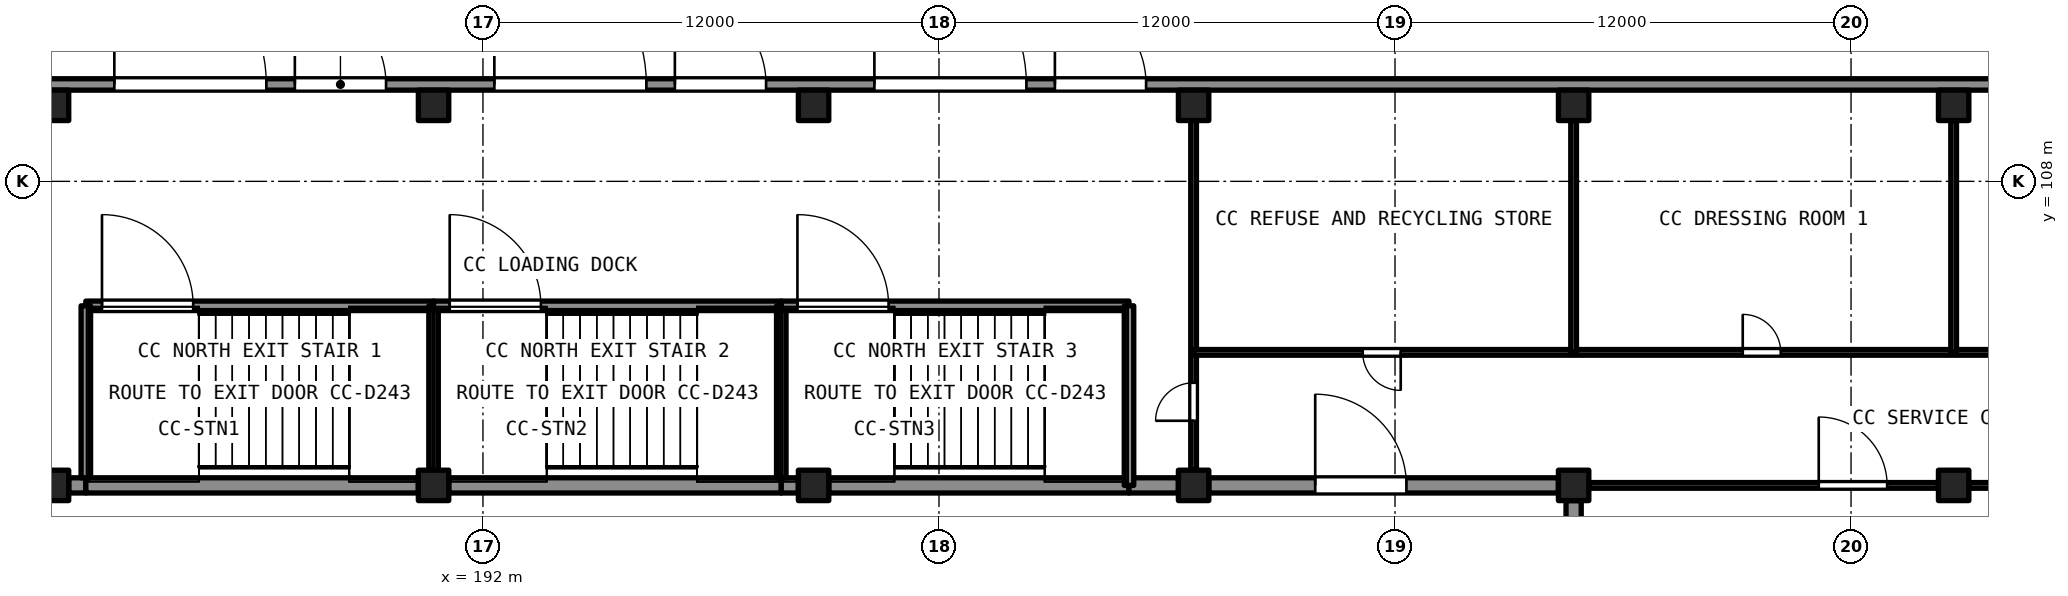
"""IFC4 building model, lengths in metres.
Left out: names, types, materials, properties, quantities, classifications, styles, units other than length and angle.
Written with IfcOpenShell. Run it as: python <this file> out.ifc"""

import sys

from ifc_helpers import new_model, si_unit, direction, frame, frame_2d, origin, origin_2d, place, context, subcontext, project, spatial, rectangle, extrude, element, fill, save


model = new_model("IFC4")
c1 = context("Model", 3, precision=1e-05, world=origin(), true_north=direction((0.0, 1.0)))
c2 = subcontext(c1, "Body", "Model", "MODEL_VIEW")
j1 = project(units=[si_unit("LENGTHUNIT", "METRE"), si_unit("PLANEANGLEUNIT", "RADIAN")], contexts=[c1])
p1 = place(None, origin())
s1 = spatial("IfcSite", under=j1, at=p1, CompositionType="ELEMENT")
p2 = place(p1, origin())
s2 = spatial("IfcBuilding", under=s1, at=p2, CompositionType="ELEMENT")
p3 = place(p2, origin())
s3 = spatial("IfcBuildingStorey", under=s2, at=p3, CompositionType="ELEMENT", Elevation=0.0)
for number, where, z_axis, x_axis in (
    (1, (180.7, 100.0, -1.2), (0.0, 0.0, 1.0), (1.0, 0.0, 0.0)),
    (2, (180.7, 110.0, -1.2), (0.0, 0.0, 1.0), (1.0, 0.0, 0.0)),
    (3, (190.7, 100.0, -1.2), (0.0, 0.0, 1.0), (1.0, 0.0, 0.0)),
    (4, (190.7, 110.0, -1.2), (0.0, 0.0, 1.0), (1.0, 0.0, 0.0)),
    (5, (200.7, 100.0, -1.2), (0.0, 0.0, 1.0), (1.0, 0.0, 0.0)),
    (6, (200.7, 110.0, -1.2), (0.0, 0.0, 1.0), (1.0, 0.0, 0.0)),
    (7, (210.7, 100.0, -1.2), (0.0, 0.0, 1.0), (1.0, 0.0, 0.0)),
    (8, (210.7, 110.0, -1.2), (0.0, 0.0, 1.0), (1.0, 0.0, 0.0)),
    (9, (220.7, 100.0, -1.2), (0.0, 0.0, 1.0), (1.0, 0.0, 0.0)),
    (10, (220.7, 110.0, -1.2), (0.0, 0.0, 1.0), (1.0, 0.0, 0.0)),
):
    element("IfcColumn", number, at=place(p3, frame(where, z_axis=z_axis, x_axis=x_axis)), inside=s3, PredefinedType="COLUMN", context=c2, shape_type="SweptSolid", body=[
        extrude(rectangle(XDim=0.8, YDim=0.8, at=origin_2d()), origin(), (0.0, 0.0, 1.0), 10.2),
    ])
p4 = place(p3, frame((230.7, 100.0, -1.2), z_axis=(0.0, 0.0, 1.0), x_axis=(1.0, 0.0, 0.0)))
e11 = element("IfcColumn", 11, at=p4, inside=s3, PredefinedType="COLUMN", context=c2, shape_type="SweptSolid", body=[
    extrude(rectangle(XDim=0.8, YDim=0.8, at=origin_2d()), origin(), (0.0, 0.0, 1.0), 9.745),
])
p5 = place(p3, frame((230.7, 110.0, -1.2), z_axis=(0.0, 0.0, 1.0), x_axis=(1.0, 0.0, 0.0)))
e12 = element("IfcColumn", 12, at=p5, inside=s3, PredefinedType="COLUMN", context=c2, shape_type="SweptSolid", body=[
    extrude(rectangle(XDim=0.8, YDim=0.8, at=origin_2d()), origin(), (0.0, 0.0, 1.0), 10.2),
])
p6 = place(p3, frame((181.1, 100.0, 0.0), z_axis=(0.0, 0.0, 1.0), x_axis=(1.0, 0.0, 0.0)))
e13 = element("IfcWall", 13, at=p6, inside=s3, PredefinedType="SHEAR", context=c2, shape_type="SweptSolid", body=[
    extrude(rectangle(XDim=0.45, YDim=0.4, at=frame_2d((0.225, 0.0))), origin(), (0.0, 0.0, 1.0), 9.0),
])
for number, where, z_axis, x_axis in (
    (14, (181.55, 100.0, 0.0), (0.0, 0.0, 1.0), (1.0, 0.0, 0.0)),
    (15, (191.1, 100.0, 0.0), (0.0, 0.0, 1.0), (1.0, 0.0, 0.0)),
):
    element("IfcWall", number, at=place(p3, frame(where, z_axis=z_axis, x_axis=x_axis)), inside=s3, PredefinedType="SHEAR", context=c2, shape_type="SweptSolid", body=[
        extrude(rectangle(XDim=8.75, YDim=0.4, at=frame_2d((4.375, 0.0))), origin(), (0.0, 0.0, 1.0), 9.0),
    ])
p7 = place(p3, frame((199.85, 100.0, 0.0), z_axis=(0.0, 0.0, 1.0), x_axis=(1.0, 0.0, 0.0)))
e16 = element("IfcWall", 16, at=p7, inside=s3, PredefinedType="SHEAR", context=c2, shape_type="SweptSolid", body=[
    extrude(rectangle(XDim=0.45, YDim=0.4, at=frame_2d((0.225, 0.0))), origin(), (0.0, 0.0, 1.0), 9.0),
])
p8 = place(p3, frame((201.1, 100.0, 0.0), z_axis=(0.0, 0.0, 1.0), x_axis=(1.0, 0.0, 0.0)))
e17 = element("IfcWall", 17, at=p8, inside=s3, PredefinedType="SHEAR", context=c2, shape_type="SweptSolid", body=[
    extrude(rectangle(XDim=7.9, YDim=0.4, at=frame_2d((3.95, 0.0))), origin(), (0.0, 0.0, 1.0), 9.0),
])
p9 = place(p3, frame((209.0, 100.0, 0.0), z_axis=(0.0, 0.0, 1.0), x_axis=(1.0, 0.0, 0.0)))
e18 = element("IfcWall", 18, at=p9, inside=s3, PredefinedType="SHEAR", context=c2, shape_type="SweptSolid", body=[
    extrude(rectangle(XDim=1.3, YDim=0.4, at=frame_2d((0.65, 0.0))), origin(), (0.0, 0.0, 1.0), 9.0),
])
p10 = place(p3, frame((211.1, 100.0, 0.0), z_axis=(0.0, 0.0, 1.0), x_axis=(1.0, 0.0, 0.0)))
e19 = element("IfcWall", 19, at=p10, inside=s3, PredefinedType="SHEAR", context=c2, shape_type="SweptSolid", body=[
    extrude(rectangle(XDim=9.2, YDim=0.4, at=frame_2d((4.6, 0.0))), origin(), (0.0, 0.0, 1.0), 9.0),
])
p11 = place(p10, frame((2.8, 0.0, 0.0)))
e20 = element("IfcOpeningElement", 20, at=p11, cuts=e19, PredefinedType="OPENING", context=c2, shape_type="SweptSolid", body=[
    extrude(rectangle(XDim=2.4, YDim=2.4, at=frame_2d((1.2, 1.2))), frame((0.0, 0.21, 0.0), z_axis=(0.0, -1.0, 0.0), x_axis=(1.0, 0.0, 0.0)), (0.0, 0.0, 1.0), 0.421),
])
p12 = place(p3, frame((220.7, 90.4, 0.0), z_axis=(0.0, 0.0, 1.0), x_axis=(0.0, 1.0, 0.0)))
e21 = element("IfcWall", 21, at=p12, inside=s3, PredefinedType="SHEAR", context=c2, shape_type="SweptSolid", body=[
    extrude(rectangle(XDim=9.2, YDim=0.4, at=frame_2d((4.6, 0.0))), origin(), (0.0, 0.0, 1.0), 9.0),
])
p13 = place(p3, frame((170.7, 110.55, 0.0), z_axis=(0.0, 0.0, 1.0), x_axis=(1.0, 0.0, 0.0)))
e22 = element("IfcWall", 22, at=p13, inside=s3, PredefinedType="SOLIDWALL", context=c2, shape_type="SweptSolid", body=[
    extrude(rectangle(XDim=80.55, YDim=0.3, at=frame_2d((40.275, 0.0))), origin(), (0.0, 0.0, 1.0), 8.59),
])
p14 = place(p13, frame((1.6, 0.0, 0.0)))
e23 = element("IfcOpeningElement", 23, at=p14, cuts=e22, PredefinedType="OPENING", context=c2, shape_type="SweptSolid", body=[
    extrude(rectangle(XDim=4.0, YDim=4.2, at=frame_2d((2.0, 2.1))), frame((0.0, 0.161, 0.0), z_axis=(0.0, -1.0, 0.0), x_axis=(1.0, 0.0, 0.0)), (0.0, 0.0, 1.0), 0.321),
])
p15 = place(p13, frame((11.6, 0.0, 0.0)))
e24 = element("IfcOpeningElement", 24, at=p15, cuts=e22, PredefinedType="OPENING", context=c2, shape_type="SweptSolid", body=[
    extrude(rectangle(XDim=4.0, YDim=4.2, at=frame_2d((2.0, 2.1))), frame((0.0, 0.161, 0.0), z_axis=(0.0, -1.0, 0.0), x_axis=(1.0, 0.0, 0.0)), (0.0, 0.0, 1.0), 0.321),
])
p16 = place(p13, frame((21.6, 0.0, 0.0)))
e25 = element("IfcOpeningElement", 25, at=p16, cuts=e22, PredefinedType="OPENING", context=c2, shape_type="SweptSolid", body=[
    extrude(rectangle(XDim=4.0, YDim=4.2, at=frame_2d((2.0, 2.1))), frame((0.0, 0.161, 0.0), z_axis=(0.0, -1.0, 0.0), x_axis=(1.0, 0.0, 0.0)), (0.0, 0.0, 1.0), 0.321),
])
p17 = place(p13, frame((31.6, 0.0, 0.0)))
e26 = element("IfcOpeningElement", 26, at=p17, cuts=e22, PredefinedType="OPENING", context=c2, shape_type="SweptSolid", body=[
    extrude(rectangle(XDim=4.0, YDim=4.2, at=frame_2d((2.0, 2.1))), frame((0.0, 0.161, 0.0), z_axis=(0.0, -1.0, 0.0), x_axis=(1.0, 0.0, 0.0)), (0.0, 0.0, 1.0), 0.321),
])
p18 = place(p13, frame((16.35, 0.0, 0.0)))
e27 = element("IfcOpeningElement", 27, at=p18, cuts=e22, PredefinedType="OPENING", context=c2, shape_type="SweptSolid", body=[
    extrude(rectangle(XDim=2.4, YDim=2.1, at=frame_2d((1.2, 1.05))), frame((0.0, 0.161, 0.0), z_axis=(0.0, -1.0, 0.0), x_axis=(1.0, 0.0, 0.0)), (0.0, 0.0, 1.0), 0.321),
])
p19 = place(p13, frame((26.35, 0.0, 0.0)))
e28 = element("IfcOpeningElement", 28, at=p19, cuts=e22, PredefinedType="OPENING", context=c2, shape_type="SweptSolid", body=[
    extrude(rectangle(XDim=2.4, YDim=2.1, at=frame_2d((1.2, 1.05))), frame((0.0, 0.161, 0.0), z_axis=(0.0, -1.0, 0.0), x_axis=(1.0, 0.0, 0.0)), (0.0, 0.0, 1.0), 0.321),
])
p20 = place(p13, frame((36.35, 0.0, 0.0)))
e29 = element("IfcOpeningElement", 29, at=p20, cuts=e22, PredefinedType="OPENING", context=c2, shape_type="SweptSolid", body=[
    extrude(rectangle(XDim=2.4, YDim=2.1, at=frame_2d((1.2, 1.05))), frame((0.0, 0.161, 0.0), z_axis=(0.0, -1.0, 0.0), x_axis=(1.0, 0.0, 0.0)), (0.0, 0.0, 1.0), 0.321),
])
p21 = place(p3, frame((221.1, 100.0, 0.0), z_axis=(0.0, 0.0, 1.0), x_axis=(1.0, 0.0, 0.0)))
e30 = element("IfcWall", 30, at=p21, inside=s3, PredefinedType="PARTITIONING", context=c2, shape_type="SweptSolid", body=[
    extrude(rectangle(XDim=9.2, YDim=0.15, at=frame_2d((4.6, 0.0))), origin(), (0.0, 0.0, 1.0), 8.54),
])
p22 = place(p21, frame((6.05, 0.0, 0.0)))
e31 = element("IfcOpeningElement", 31, at=p22, cuts=e30, PredefinedType="OPENING", context=c2, shape_type="SweptSolid", body=[
    extrude(rectangle(XDim=1.8, YDim=2.1, at=frame_2d((0.9, 1.05))), frame((0.0, 0.085, 0.0), z_axis=(0.0, -1.0, 0.0), x_axis=(1.0, 0.0, 0.0)), (0.0, 0.0, 1.0), 0.171),
])
p23 = place(p3, frame((231.1, 100.0, 0.0), z_axis=(0.0, 0.0, 1.0), x_axis=(1.0, 0.0, 0.0)))
e32 = element("IfcWall", 32, at=p23, inside=s3, PredefinedType="PARTITIONING", context=c2, shape_type="SweptSolid", body=[
    extrude(rectangle(XDim=7.3, YDim=0.15, at=frame_2d((3.65, 0.0))), origin(), (0.0, 0.0, 1.0), 8.54),
])
p24 = place(p3, frame((181.55, 104.725, 0.0), z_axis=(0.0, 0.0, 1.0), x_axis=(1.0, 0.0, 0.0)))
e33 = element("IfcWall", 33, at=p24, inside=s3, PredefinedType="SHEAR", context=c2, shape_type="SweptSolid", body=[
    extrude(rectangle(XDim=9.15, YDim=0.25, at=frame_2d((4.575, 0.0))), origin(), (0.0, 0.0, 1.0), 8.59),
])
p25 = place(p24, frame((0.425, 0.0, 0.0)))
e34 = element("IfcOpeningElement", 34, at=p25, cuts=e33, PredefinedType="OPENING", context=c2, shape_type="SweptSolid", body=[
    extrude(rectangle(XDim=2.4, YDim=2.1, at=frame_2d((1.2, 1.05))), frame((0.0, 0.135, 0.0), z_axis=(0.0, -1.0, 0.0), x_axis=(1.0, 0.0, 0.0)), (0.0, 0.0, 1.0), 0.271),
])
p26 = place(p3, frame((181.55, 100.2, 0.0), z_axis=(0.0, 0.0, 1.0), x_axis=(0.0, 1.0, 0.0)))
e35 = element("IfcWall", 35, at=p26, inside=s3, PredefinedType="SHEAR", context=c2, shape_type="SweptSolid", body=[
    extrude(rectangle(XDim=4.525, YDim=0.25, at=frame_2d((2.263, 0.0))), origin(), (0.0, 0.0, 1.0), 8.59),
])
p27 = place(p3, frame((190.7, 100.4, 0.0), z_axis=(0.0, 0.0, 1.0), x_axis=(0.0, 1.0, 0.0)))
e36 = element("IfcWall", 36, at=p27, inside=s3, PredefinedType="SHEAR", context=c2, shape_type="SweptSolid", body=[
    extrude(rectangle(XDim=4.325, YDim=0.25, at=frame_2d((2.163, 0.0))), origin(), (0.0, 0.0, 1.0), 8.59),
])
p28 = place(p3, frame((190.7, 104.725, 0.0), z_axis=(0.0, 0.0, 1.0), x_axis=(1.0, 0.0, 0.0)))
e37 = element("IfcWall", 37, at=p28, inside=s3, PredefinedType="SHEAR", context=c2, shape_type="SweptSolid", body=[
    extrude(rectangle(XDim=9.15, YDim=0.25, at=frame_2d((4.575, 0.0))), origin(), (0.0, 0.0, 1.0), 8.59),
])
p29 = place(p28, frame((0.425, 0.0, 0.0)))
e38 = element("IfcOpeningElement", 38, at=p29, cuts=e37, PredefinedType="OPENING", context=c2, shape_type="SweptSolid", body=[
    extrude(rectangle(XDim=2.4, YDim=2.1, at=frame_2d((1.2, 1.05))), frame((0.0, 0.135, 0.0), z_axis=(0.0, -1.0, 0.0), x_axis=(1.0, 0.0, 0.0)), (0.0, 0.0, 1.0), 0.271),
])
p30 = place(p3, frame((199.85, 100.2, 0.0), z_axis=(0.0, 0.0, 1.0), x_axis=(0.0, 1.0, 0.0)))
e39 = element("IfcWall", 39, at=p30, inside=s3, PredefinedType="SHEAR", context=c2, shape_type="SweptSolid", body=[
    extrude(rectangle(XDim=4.525, YDim=0.25, at=frame_2d((2.263, 0.0))), origin(), (0.0, 0.0, 1.0), 8.59),
])
p31 = place(p3, frame((199.85, 104.725, 0.0), z_axis=(0.0, 0.0, 1.0), x_axis=(1.0, 0.0, 0.0)))
e40 = element("IfcWall", 40, at=p31, inside=s3, PredefinedType="SHEAR", context=c2, shape_type="SweptSolid", body=[
    extrude(rectangle(XDim=9.15, YDim=0.25, at=frame_2d((4.575, 0.0))), origin(), (0.0, 0.0, 1.0), 8.59),
])
p32 = place(p31, frame((0.425, 0.0, 0.0)))
e41 = element("IfcOpeningElement", 41, at=p32, cuts=e40, PredefinedType="OPENING", context=c2, shape_type="SweptSolid", body=[
    extrude(rectangle(XDim=2.4, YDim=2.1, at=frame_2d((1.2, 1.05))), frame((0.0, 0.135, 0.0), z_axis=(0.0, -1.0, 0.0), x_axis=(1.0, 0.0, 0.0)), (0.0, 0.0, 1.0), 0.271),
])
p33 = place(p3, frame((209.0, 100.0, 0.0), z_axis=(0.0, 0.0, 1.0), x_axis=(0.0, 1.0, 0.0)))
e42 = element("IfcWall", 42, at=p33, inside=s3, PredefinedType="SHEAR", context=c2, shape_type="SweptSolid", body=[
    extrude(rectangle(XDim=4.725, YDim=0.25, at=frame_2d((2.363, 0.0))), origin(), (0.0, 0.0, 1.0), 8.59),
])
p34 = place(p3, frame((210.7, 109.6, 0.0), z_axis=(0.0, 0.0, 1.0), x_axis=(0.0, -1.0, 0.0)))
e43 = element("IfcWall", 43, at=p34, inside=s3, PredefinedType="PARTITIONING", context=c2, shape_type="SweptSolid", body=[
    extrude(rectangle(XDim=9.2, YDim=0.15, at=frame_2d((4.6, 0.0))), origin(), (0.0, 0.0, 1.0), 8.59),
])
p35 = place(p34, frame((6.9, 0.0, 0.0)))
e44 = element("IfcOpeningElement", 44, at=p35, cuts=e43, PredefinedType="OPENING", context=c2, shape_type="SweptSolid", body=[
    extrude(rectangle(XDim=1.0, YDim=2.1, at=frame_2d((0.5, 1.05))), frame((0.0, 0.085, 0.0), z_axis=(0.0, -1.0, 0.0), x_axis=(1.0, 0.0, 0.0)), (0.0, 0.0, 1.0), 0.171),
])
p36 = place(p3, frame((251.1, 103.5, 0.0), z_axis=(0.0, 0.0, 1.0), x_axis=(-1.0, 0.0, 0.0)))
e45 = element("IfcWall", 45, at=p36, inside=s3, PredefinedType="PARTITIONING", context=c2, shape_type="SweptSolid", body=[
    extrude(rectangle(XDim=40.4, YDim=0.15, at=frame_2d((20.2, 0.0))), origin(), (0.0, 0.0, 1.0), 8.59),
])
p37 = place(p36, frame((34.95, 0.0, 0.0)))
e46 = element("IfcOpeningElement", 46, at=p37, cuts=e45, PredefinedType="OPENING", context=c2, shape_type="SweptSolid", body=[
    extrude(rectangle(XDim=1.0, YDim=2.1, at=frame_2d((0.5, 1.05))), frame((0.0, 0.085, 0.0), z_axis=(0.0, -1.0, 0.0), x_axis=(1.0, 0.0, 0.0)), (0.0, 0.0, 1.0), 0.171),
])
p38 = place(p36, frame((24.95, 0.0, 0.0)))
e47 = element("IfcOpeningElement", 47, at=p38, cuts=e45, PredefinedType="OPENING", context=c2, shape_type="SweptSolid", body=[
    extrude(rectangle(XDim=1.0, YDim=2.1, at=frame_2d((0.5, 1.05))), frame((0.0, 0.085, 0.0), z_axis=(0.0, -1.0, 0.0), x_axis=(1.0, 0.0, 0.0)), (0.0, 0.0, 1.0), 0.171),
])
p39 = place(p36, frame((14.95, 0.0, 0.0)))
e48 = element("IfcOpeningElement", 48, at=p39, cuts=e45, PredefinedType="OPENING", context=c2, shape_type="SweptSolid", body=[
    extrude(rectangle(XDim=1.0, YDim=2.1, at=frame_2d((0.5, 1.05))), frame((0.0, 0.085, 0.0), z_axis=(0.0, -1.0, 0.0), x_axis=(1.0, 0.0, 0.0)), (0.0, 0.0, 1.0), 0.171),
])
p40 = place(p36, frame((6.95, 0.0, 0.0)))
e49 = element("IfcOpeningElement", 49, at=p40, cuts=e45, PredefinedType="OPENING", context=c2, shape_type="SweptSolid", body=[
    extrude(rectangle(XDim=1.0, YDim=2.1, at=frame_2d((0.5, 1.05))), frame((0.0, 0.085, 0.0), z_axis=(0.0, -1.0, 0.0), x_axis=(1.0, 0.0, 0.0)), (0.0, 0.0, 1.0), 0.171),
])
p41 = place(p36, frame((1.7, 0.0, 0.0)))
e50 = element("IfcOpeningElement", 50, at=p41, cuts=e45, PredefinedType="OPENING", context=c2, shape_type="SweptSolid", body=[
    extrude(rectangle(XDim=1.0, YDim=2.1, at=frame_2d((0.5, 1.05))), frame((0.0, 0.085, 0.0), z_axis=(0.0, -1.0, 0.0), x_axis=(1.0, 0.0, 0.0)), (0.0, 0.0, 1.0), 0.171),
])
for number, where, z_axis, x_axis in (
    (51, (220.7, 103.5, 0.0), (0.0, 0.0, 1.0), (0.0, 1.0, 0.0)),
    (52, (230.7, 103.5, 0.0), (0.0, 0.0, 1.0), (0.0, 1.0, 0.0)),
):
    element("IfcWall", number, at=place(p3, frame(where, z_axis=z_axis, x_axis=x_axis)), inside=s3, PredefinedType="PARTITIONING", context=c2, shape_type="SweptSolid", body=[
        extrude(rectangle(XDim=6.1, YDim=0.15, at=frame_2d((3.05, 0.0))), origin(), (0.0, 0.0, 1.0), 8.59),
    ])
p42 = place(p11, origin())
e53 = element("IfcDoor", 53, at=p42, inside=s3, OperationType="DOUBLE_DOOR_SINGLE_SWING", PredefinedType="DOOR", context=c2, shape_type="SweptSolid", body=[
    extrude(rectangle(XDim=2.4, YDim=2.4, at=frame_2d((1.2, 1.2))), frame((0.0, 0.025, 0.0), z_axis=(0.0, -1.0, 0.0), x_axis=(1.0, 0.0, 0.0)), (0.0, 0.0, 1.0), 0.05),
])
fill(e20, e53)
p43 = place(p35, origin())
e54 = element("IfcDoor", 54, at=p43, inside=s3, OperationType="SINGLE_SWING_RIGHT", PredefinedType="DOOR", context=c2, shape_type="SweptSolid", body=[
    extrude(rectangle(XDim=1.0, YDim=2.1, at=frame_2d((0.5, 1.05))), frame((0.0, 0.025, 0.0), z_axis=(0.0, -1.0, 0.0), x_axis=(1.0, 0.0, 0.0)), (0.0, 0.0, 1.0), 0.05),
])
fill(e44, e54)
p44 = place(p37, origin())
e55 = element("IfcDoor", 55, at=p44, inside=s3, OperationType="SINGLE_SWING_LEFT", PredefinedType="DOOR", context=c2, shape_type="SweptSolid", body=[
    extrude(rectangle(XDim=1.0, YDim=2.1, at=frame_2d((0.5, 1.05))), frame((0.0, 0.025, 0.0), z_axis=(0.0, -1.0, 0.0), x_axis=(1.0, 0.0, 0.0)), (0.0, 0.0, 1.0), 0.05),
])
fill(e46, e55)
p45 = place(p38, origin())
e56 = element("IfcDoor", 56, at=p45, inside=s3, OperationType="SINGLE_SWING_RIGHT", PredefinedType="DOOR", context=c2, shape_type="SweptSolid", body=[
    extrude(rectangle(XDim=1.0, YDim=2.1, at=frame_2d((0.5, 1.05))), frame((0.0, 0.025, 0.0), z_axis=(0.0, -1.0, 0.0), x_axis=(1.0, 0.0, 0.0)), (0.0, 0.0, 1.0), 0.05),
])
fill(e47, e56)
p46 = place(p22, origin())
e57 = element("IfcDoor", 57, at=p46, inside=s3, OperationType="DOUBLE_DOOR_SINGLE_SWING", PredefinedType="DOOR", context=c2, shape_type="SweptSolid", body=[
    extrude(rectangle(XDim=1.8, YDim=2.1, at=frame_2d((0.9, 1.05))), frame((0.0, 0.025, 0.0), z_axis=(0.0, -1.0, 0.0), x_axis=(1.0, 0.0, 0.0)), (0.0, 0.0, 1.0), 0.05),
])
fill(e31, e57)
p47 = place(p15, origin())
e58 = element("IfcDoor", 58, at=p47, inside=s3, OperationType="ROLLINGUP", PredefinedType="DOOR", context=c2, shape_type="SweptSolid", body=[
    extrude(rectangle(XDim=4.0, YDim=4.2, at=frame_2d((2.0, 2.1))), frame((0.0, 0.025, 0.0), z_axis=(0.0, -1.0, 0.0), x_axis=(1.0, 0.0, 0.0)), (0.0, 0.0, 1.0), 0.05),
])
fill(e24, e58)
p48 = place(p16, origin())
e59 = element("IfcDoor", 59, at=p48, inside=s3, OperationType="ROLLINGUP", PredefinedType="DOOR", context=c2, shape_type="SweptSolid", body=[
    extrude(rectangle(XDim=4.0, YDim=4.2, at=frame_2d((2.0, 2.1))), frame((0.0, 0.025, 0.0), z_axis=(0.0, -1.0, 0.0), x_axis=(1.0, 0.0, 0.0)), (0.0, 0.0, 1.0), 0.05),
])
fill(e25, e59)
p49 = place(p17, origin())
e60 = element("IfcDoor", 60, at=p49, inside=s3, OperationType="ROLLINGUP", PredefinedType="DOOR", context=c2, shape_type="SweptSolid", body=[
    extrude(rectangle(XDim=4.0, YDim=4.2, at=frame_2d((2.0, 2.1))), frame((0.0, 0.025, 0.0), z_axis=(0.0, -1.0, 0.0), x_axis=(1.0, 0.0, 0.0)), (0.0, 0.0, 1.0), 0.05),
])
fill(e26, e60)
p50 = place(p25, origin())
e61 = element("IfcDoor", 61, at=p50, inside=s3, OperationType="DOUBLE_DOOR_SINGLE_SWING", PredefinedType="DOOR", context=c2, shape_type="SweptSolid", body=[
    extrude(rectangle(XDim=2.4, YDim=2.1, at=frame_2d((1.2, 1.05))), frame((0.0, 0.025, 0.0), z_axis=(0.0, -1.0, 0.0), x_axis=(1.0, 0.0, 0.0)), (0.0, 0.0, 1.0), 0.05),
])
fill(e34, e61)
p51 = place(p29, origin())
e62 = element("IfcDoor", 62, at=p51, inside=s3, OperationType="DOUBLE_DOOR_SINGLE_SWING", PredefinedType="DOOR", context=c2, shape_type="SweptSolid", body=[
    extrude(rectangle(XDim=2.4, YDim=2.1, at=frame_2d((1.2, 1.05))), frame((0.0, 0.025, 0.0), z_axis=(0.0, -1.0, 0.0), x_axis=(1.0, 0.0, 0.0)), (0.0, 0.0, 1.0), 0.05),
])
fill(e38, e62)
p52 = place(p32, origin())
e63 = element("IfcDoor", 63, at=p52, inside=s3, OperationType="DOUBLE_DOOR_SINGLE_SWING", PredefinedType="DOOR", context=c2, shape_type="SweptSolid", body=[
    extrude(rectangle(XDim=2.4, YDim=2.1, at=frame_2d((1.2, 1.05))), frame((0.0, 0.025, 0.0), z_axis=(0.0, -1.0, 0.0), x_axis=(1.0, 0.0, 0.0)), (0.0, 0.0, 1.0), 0.05),
])
fill(e41, e63)
p53 = place(p18, origin())
e64 = element("IfcDoor", 64, at=p53, inside=s3, OperationType="DOUBLE_DOOR_SINGLE_SWING", PredefinedType="DOOR", context=c2, shape_type="SweptSolid", body=[
    extrude(rectangle(XDim=2.4, YDim=2.1, at=frame_2d((1.2, 1.05))), frame((0.0, 0.025, 0.0), z_axis=(0.0, -1.0, 0.0), x_axis=(1.0, 0.0, 0.0)), (0.0, 0.0, 1.0), 0.05),
])
fill(e27, e64)
p54 = place(p19, origin())
e65 = element("IfcDoor", 65, at=p54, inside=s3, OperationType="DOUBLE_DOOR_SINGLE_SWING", PredefinedType="DOOR", context=c2, shape_type="SweptSolid", body=[
    extrude(rectangle(XDim=2.4, YDim=2.1, at=frame_2d((1.2, 1.05))), frame((0.0, 0.025, 0.0), z_axis=(0.0, -1.0, 0.0), x_axis=(1.0, 0.0, 0.0)), (0.0, 0.0, 1.0), 0.05),
])
fill(e28, e65)
p55 = place(p20, origin())
e66 = element("IfcDoor", 66, at=p55, inside=s3, OperationType="DOUBLE_DOOR_SINGLE_SWING", PredefinedType="DOOR", context=c2, shape_type="SweptSolid", body=[
    extrude(rectangle(XDim=2.4, YDim=2.1, at=frame_2d((1.2, 1.05))), frame((0.0, 0.025, 0.0), z_axis=(0.0, -1.0, 0.0), x_axis=(1.0, 0.0, 0.0)), (0.0, 0.0, 1.0), 0.05),
])
fill(e29, e66)
save(model, sys.argv[1])
